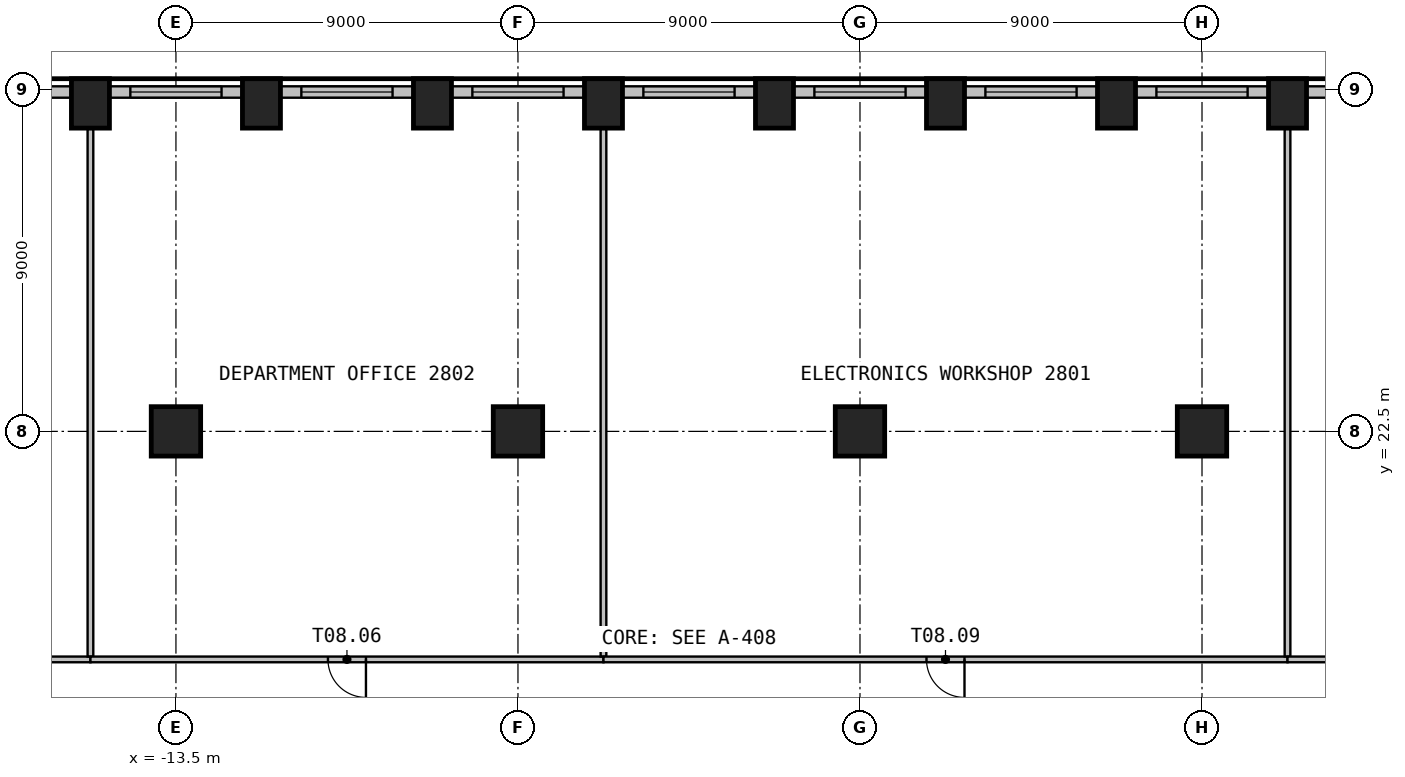
"""IFC4 building model, lengths in metres.
Left out: names, types, materials, properties, quantities, classifications, styles, units other than length and angle.
Written with IfcOpenShell. Run it as: python <this file> out.ifc"""

import sys

from ifc_helpers import new_model, si_unit, direction, frame, frame_2d, origin, origin_2d, place, context, subcontext, project, spatial, rectangle, circle, extrude, element, fill, save


model = new_model("IFC4")
c1 = context("Model", 3, precision=1e-05, world=origin(), true_north=direction((0.0, 1.0)))
c2 = subcontext(c1, "Body", "Model", "MODEL_VIEW")
j1 = project(units=[si_unit("LENGTHUNIT", "METRE"), si_unit("PLANEANGLEUNIT", "RADIAN")], contexts=[c1])
p1 = place(None, origin())
s1 = spatial("IfcSite", under=j1, at=p1, CompositionType="ELEMENT")
p2 = place(p1, origin())
s2 = spatial("IfcBuilding", under=s1, at=p2, CompositionType="ELEMENT")
p3 = place(p2, frame((0.0, 0.0, 116.4)))
s3 = spatial("IfcBuildingStorey", under=s2, at=p3, CompositionType="ELEMENT", Elevation=116.4)
for number, where, z_axis, x_axis in (
    (1, (15.75, 31.13, 0.0), (0.0, 0.0, 1.0), (-1.0, 0.0, 0.0)),
    (2, (11.25, 31.13, 0.0), (0.0, 0.0, 1.0), (-1.0, 0.0, 0.0)),
    (3, (6.75, 31.13, 0.0), (0.0, 0.0, 1.0), (-1.0, 0.0, 0.0)),
    (4, (2.25, 31.13, 0.0), (0.0, 0.0, 1.0), (-1.0, 0.0, 0.0)),
    (5, (-2.25, 31.13, 0.0), (0.0, 0.0, 1.0), (-1.0, 0.0, 0.0)),
    (6, (-6.75, 31.13, 0.0), (0.0, 0.0, 1.0), (-1.0, 0.0, 0.0)),
    (7, (-11.25, 31.13, 0.0), (0.0, 0.0, 1.0), (-1.0, 0.0, 0.0)),
    (8, (-15.75, 31.13, 0.0), (0.0, 0.0, 1.0), (-1.0, 0.0, 0.0)),
):
    element("IfcColumn", number, at=place(p3, frame(where, z_axis=z_axis, x_axis=x_axis)), inside=s3, PredefinedType="COLUMN", context=c2, shape_type="SweptSolid", body=[
        extrude(rectangle(XDim=1.0, YDim=1.3, at=origin_2d()), origin(), (0.0, 0.0, 1.0), 3.525),
    ])
for number, where, z_axis, x_axis in (
    (9, (-13.5, 22.5, 0.0), (0.0, 0.0, 1.0), (1.0, 0.0, 0.0)),
    (10, (-4.5, 22.5, 0.0), (0.0, 0.0, 1.0), (1.0, 0.0, 0.0)),
    (11, (4.5, 22.5, 0.0), (0.0, 0.0, 1.0), (1.0, 0.0, 0.0)),
    (12, (13.5, 22.5, 0.0), (0.0, 0.0, 1.0), (1.0, 0.0, 0.0)),
):
    element("IfcColumn", number, at=place(p3, frame(where, z_axis=z_axis, x_axis=x_axis)), inside=s3, PredefinedType="COLUMN", context=c2, shape_type="SweptSolid", body=[
        extrude(circle(Radius=0.65, at=origin_2d()), origin(), (0.0, 0.0, 1.0), 3.525),
    ])
p4 = place(p3, frame((19.443, 31.43, 0.0), z_axis=(0.0, 0.0, 1.0), x_axis=(-1.0, 0.0, 0.0)))
e13 = element("IfcWall", 13, at=p4, inside=s3, PredefinedType="SOLIDWALL", context=c2, shape_type="SweptSolid", body=[
    extrude(rectangle(XDim=3.192, YDim=0.3, at=frame_2d((1.596, 0.0))), origin(), (0.0, 0.0, 1.0), 3.525),
])
p5 = place(p4, frame((0.243, 0.0, 0.9)))
e14 = element("IfcOpeningElement", 14, at=p5, cuts=e13, PredefinedType="OPENING", context=c2, shape_type="SweptSolid", body=[
    extrude(rectangle(XDim=2.4, YDim=2.1, at=frame_2d((1.2, 1.05))), frame((0.0, 0.16, 0.0), z_axis=(0.0, -1.0, 0.0), x_axis=(1.0, 0.0, 0.0)), (0.0, 0.0, 1.0), 0.32),
])
p6 = place(p3, frame((15.25, 31.43, 0.0), z_axis=(0.0, 0.0, 1.0), x_axis=(-1.0, 0.0, 0.0)))
e15 = element("IfcWall", 15, at=p6, inside=s3, PredefinedType="SOLIDWALL", context=c2, shape_type="SweptSolid", body=[
    extrude(rectangle(XDim=3.499, YDim=0.3, at=frame_2d((1.75, 0.0))), origin(), (0.0, 0.0, 1.0), 3.525),
])
p7 = place(p6, frame((0.55, 0.0, 0.9)))
e16 = element("IfcOpeningElement", 16, at=p7, cuts=e15, PredefinedType="OPENING", context=c2, shape_type="SweptSolid", body=[
    extrude(rectangle(XDim=2.4, YDim=2.1, at=frame_2d((1.2, 1.05))), frame((0.0, 0.16, 0.0), z_axis=(0.0, -1.0, 0.0), x_axis=(1.0, 0.0, 0.0)), (0.0, 0.0, 1.0), 0.32),
])
p8 = place(p3, frame((10.75, 31.43, 0.0), z_axis=(0.0, 0.0, 1.0), x_axis=(-1.0, 0.0, 0.0)))
e17 = element("IfcWall", 17, at=p8, inside=s3, PredefinedType="SOLIDWALL", context=c2, shape_type="SweptSolid", body=[
    extrude(rectangle(XDim=3.499, YDim=0.3, at=frame_2d((1.75, 0.0))), origin(), (0.0, 0.0, 1.0), 3.525),
])
p9 = place(p8, frame((0.55, 0.0, 0.9)))
e18 = element("IfcOpeningElement", 18, at=p9, cuts=e17, PredefinedType="OPENING", context=c2, shape_type="SweptSolid", body=[
    extrude(rectangle(XDim=2.4, YDim=2.1, at=frame_2d((1.2, 1.05))), frame((0.0, 0.16, 0.0), z_axis=(0.0, -1.0, 0.0), x_axis=(1.0, 0.0, 0.0)), (0.0, 0.0, 1.0), 0.32),
])
p10 = place(p3, frame((6.25, 31.43, 0.0), z_axis=(0.0, 0.0, 1.0), x_axis=(-1.0, 0.0, 0.0)))
e19 = element("IfcWall", 19, at=p10, inside=s3, PredefinedType="SOLIDWALL", context=c2, shape_type="SweptSolid", body=[
    extrude(rectangle(XDim=3.499, YDim=0.3, at=frame_2d((1.75, 0.0))), origin(), (0.0, 0.0, 1.0), 3.525),
])
p11 = place(p10, frame((0.55, 0.0, 0.9)))
e20 = element("IfcOpeningElement", 20, at=p11, cuts=e19, PredefinedType="OPENING", context=c2, shape_type="SweptSolid", body=[
    extrude(rectangle(XDim=2.4, YDim=2.1, at=frame_2d((1.2, 1.05))), frame((0.0, 0.16, 0.0), z_axis=(0.0, -1.0, 0.0), x_axis=(1.0, 0.0, 0.0)), (0.0, 0.0, 1.0), 0.32),
])
p12 = place(p3, frame((1.75, 31.43, 0.0), z_axis=(0.0, 0.0, 1.0), x_axis=(-1.0, 0.0, 0.0)))
e21 = element("IfcWall", 21, at=p12, inside=s3, PredefinedType="SOLIDWALL", context=c2, shape_type="SweptSolid", body=[
    extrude(rectangle(XDim=3.499, YDim=0.3, at=frame_2d((1.75, 0.0))), origin(), (0.0, 0.0, 1.0), 3.525),
])
p13 = place(p12, frame((0.55, 0.0, 0.9)))
e22 = element("IfcOpeningElement", 22, at=p13, cuts=e21, PredefinedType="OPENING", context=c2, shape_type="SweptSolid", body=[
    extrude(rectangle(XDim=2.4, YDim=2.1, at=frame_2d((1.2, 1.05))), frame((0.0, 0.16, 0.0), z_axis=(0.0, -1.0, 0.0), x_axis=(1.0, 0.0, 0.0)), (0.0, 0.0, 1.0), 0.32),
])
p14 = place(p3, frame((-2.75, 31.43, 0.0), z_axis=(0.0, 0.0, 1.0), x_axis=(-1.0, 0.0, 0.0)))
e23 = element("IfcWall", 23, at=p14, inside=s3, PredefinedType="SOLIDWALL", context=c2, shape_type="SweptSolid", body=[
    extrude(rectangle(XDim=3.499, YDim=0.3, at=frame_2d((1.75, 0.0))), origin(), (0.0, 0.0, 1.0), 3.525),
])
p15 = place(p14, frame((0.55, 0.0, 0.9)))
e24 = element("IfcOpeningElement", 24, at=p15, cuts=e23, PredefinedType="OPENING", context=c2, shape_type="SweptSolid", body=[
    extrude(rectangle(XDim=2.4, YDim=2.1, at=frame_2d((1.2, 1.05))), frame((0.0, 0.16, 0.0), z_axis=(0.0, -1.0, 0.0), x_axis=(1.0, 0.0, 0.0)), (0.0, 0.0, 1.0), 0.32),
])
p16 = place(p3, frame((-7.25, 31.43, 0.0), z_axis=(0.0, 0.0, 1.0), x_axis=(-1.0, 0.0, 0.0)))
e25 = element("IfcWall", 25, at=p16, inside=s3, PredefinedType="SOLIDWALL", context=c2, shape_type="SweptSolid", body=[
    extrude(rectangle(XDim=3.499, YDim=0.3, at=frame_2d((1.75, 0.0))), origin(), (0.0, 0.0, 1.0), 3.525),
])
p17 = place(p16, frame((0.55, 0.0, 0.9)))
e26 = element("IfcOpeningElement", 26, at=p17, cuts=e25, PredefinedType="OPENING", context=c2, shape_type="SweptSolid", body=[
    extrude(rectangle(XDim=2.4, YDim=2.1, at=frame_2d((1.2, 1.05))), frame((0.0, 0.16, 0.0), z_axis=(0.0, -1.0, 0.0), x_axis=(1.0, 0.0, 0.0)), (0.0, 0.0, 1.0), 0.32),
])
p18 = place(p3, frame((-11.75, 31.43, 0.0), z_axis=(0.0, 0.0, 1.0), x_axis=(-1.0, 0.0, 0.0)))
e27 = element("IfcWall", 27, at=p18, inside=s3, PredefinedType="SOLIDWALL", context=c2, shape_type="SweptSolid", body=[
    extrude(rectangle(XDim=3.499, YDim=0.3, at=frame_2d((1.75, 0.0))), origin(), (0.0, 0.0, 1.0), 3.525),
])
p19 = place(p18, frame((0.55, 0.0, 0.9)))
e28 = element("IfcOpeningElement", 28, at=p19, cuts=e27, PredefinedType="OPENING", context=c2, shape_type="SweptSolid", body=[
    extrude(rectangle(XDim=2.4, YDim=2.1, at=frame_2d((1.2, 1.05))), frame((0.0, 0.16, 0.0), z_axis=(0.0, -1.0, 0.0), x_axis=(1.0, 0.0, 0.0)), (0.0, 0.0, 1.0), 0.32),
])
p20 = place(p3, frame((-16.25, 31.43, 0.0), z_axis=(0.0, 0.0, 1.0), x_axis=(-1.0, 0.0, 0.0)))
e29 = element("IfcWall", 29, at=p20, inside=s3, PredefinedType="SOLIDWALL", context=c2, shape_type="SweptSolid", body=[
    extrude(rectangle(XDim=3.192, YDim=0.3, at=frame_2d((1.596, 0.0))), origin(), (0.0, 0.0, 1.0), 3.525),
])
p21 = place(p20, frame((0.55, 0.0, 0.9)))
e30 = element("IfcOpeningElement", 30, at=p21, cuts=e29, PredefinedType="OPENING", context=c2, shape_type="SweptSolid", body=[
    extrude(rectangle(XDim=2.4, YDim=2.1, at=frame_2d((1.2, 1.05))), frame((0.0, 0.16, 0.0), z_axis=(0.0, -1.0, 0.0), x_axis=(1.0, 0.0, 0.0)), (0.0, 0.0, 1.0), 0.32),
])
p22 = place(p3, frame((-15.75, 16.5, 0.0), z_axis=(0.0, 0.0, 1.0), x_axis=(-1.0, 0.0, 0.0)))
e31 = element("IfcWall", 31, at=p22, inside=s3, PredefinedType="PARTITIONING", context=c2, shape_type="SweptSolid", body=[
    extrude(rectangle(XDim=5.175, YDim=0.15, at=frame_2d((2.587, 0.0))), origin(), (0.0, 0.0, 1.0), 3.525),
])
p23 = place(p3, frame((-15.75, 30.46, 0.0), z_axis=(0.0, 0.0, 1.0), x_axis=(0.0, -1.0, 0.0)))
e32 = element("IfcWall", 32, at=p23, inside=s3, PredefinedType="PARTITIONING", context=c2, shape_type="SweptSolid", body=[
    extrude(rectangle(XDim=13.885, YDim=0.15, at=frame_2d((6.942, 0.0))), origin(), (0.0, 0.0, 1.0), 3.525),
])
p24 = place(p3, frame((-2.25, 16.5, 0.0), z_axis=(0.0, 0.0, 1.0), x_axis=(-1.0, 0.0, 0.0)))
e33 = element("IfcWall", 33, at=p24, inside=s3, PredefinedType="PARTITIONING", context=c2, shape_type="SweptSolid", body=[
    extrude(rectangle(XDim=13.5, YDim=0.15, at=frame_2d((6.75, 0.0))), origin(), (0.0, 0.0, 1.0), 3.525),
])
p25 = place(p24, frame((6.25, 0.0, 0.0)))
e34 = element("IfcOpeningElement", 34, at=p25, cuts=e33, PredefinedType="OPENING", context=c2, shape_type="SweptSolid", body=[
    extrude(rectangle(XDim=1.0, YDim=2.1, at=frame_2d((0.5, 1.05))), frame((0.0, 0.085, 0.0), z_axis=(0.0, -1.0, 0.0), x_axis=(1.0, 0.0, 0.0)), (0.0, 0.0, 1.0), 0.17),
])
p26 = place(p3, frame((-2.25, 30.46, 0.0), z_axis=(0.0, 0.0, 1.0), x_axis=(0.0, -1.0, 0.0)))
e35 = element("IfcWall", 35, at=p26, inside=s3, PredefinedType="PARTITIONING", context=c2, shape_type="SweptSolid", body=[
    extrude(rectangle(XDim=13.885, YDim=0.15, at=frame_2d((6.942, 0.0))), origin(), (0.0, 0.0, 1.0), 3.525),
])
p27 = place(p3, frame((15.75, 16.5, 0.0), z_axis=(0.0, 0.0, 1.0), x_axis=(-1.0, 0.0, 0.0)))
e36 = element("IfcWall", 36, at=p27, inside=s3, PredefinedType="PARTITIONING", context=c2, shape_type="SweptSolid", body=[
    extrude(rectangle(XDim=18.0, YDim=0.15, at=frame_2d((9.0, 0.0))), origin(), (0.0, 0.0, 1.0), 3.525),
])
p28 = place(p27, frame((8.5, 0.0, 0.0)))
e37 = element("IfcOpeningElement", 37, at=p28, cuts=e36, PredefinedType="OPENING", context=c2, shape_type="SweptSolid", body=[
    extrude(rectangle(XDim=1.0, YDim=2.1, at=frame_2d((0.5, 1.05))), frame((0.0, 0.085, 0.0), z_axis=(0.0, -1.0, 0.0), x_axis=(1.0, 0.0, 0.0)), (0.0, 0.0, 1.0), 0.17),
])
p29 = place(p3, frame((15.75, 30.46, 0.0), z_axis=(0.0, 0.0, 1.0), x_axis=(0.0, -1.0, 0.0)))
e38 = element("IfcWall", 38, at=p29, inside=s3, PredefinedType="PARTITIONING", context=c2, shape_type="SweptSolid", body=[
    extrude(rectangle(XDim=13.885, YDim=0.15, at=frame_2d((6.942, 0.0))), origin(), (0.0, 0.0, 1.0), 3.525),
])
p30 = place(p3, frame((21.075, 16.5, 0.0), z_axis=(0.0, 0.0, 1.0), x_axis=(-1.0, 0.0, 0.0)))
e39 = element("IfcWall", 39, at=p30, inside=s3, PredefinedType="PARTITIONING", context=c2, shape_type="SweptSolid", body=[
    extrude(rectangle(XDim=5.325, YDim=0.15, at=frame_2d((2.663, 0.0))), origin(), (0.0, 0.0, 1.0), 3.525),
])
p31 = place(p7, origin())
e40 = element("IfcWindow", 40, at=p31, inside=s3, PartitioningType="SINGLE_PANEL", PredefinedType="WINDOW", context=c2, shape_type="SweptSolid", body=[
    extrude(rectangle(XDim=2.4, YDim=2.1, at=frame_2d((1.2, 1.05))), frame((0.0, 0.03, 0.0), z_axis=(0.0, -1.0, 0.0), x_axis=(1.0, 0.0, 0.0)), (0.0, 0.0, 1.0), 0.06),
])
fill(e16, e40)
p32 = place(p9, origin())
e41 = element("IfcWindow", 41, at=p32, inside=s3, PartitioningType="SINGLE_PANEL", PredefinedType="WINDOW", context=c2, shape_type="SweptSolid", body=[
    extrude(rectangle(XDim=2.4, YDim=2.1, at=frame_2d((1.2, 1.05))), frame((0.0, 0.03, 0.0), z_axis=(0.0, -1.0, 0.0), x_axis=(1.0, 0.0, 0.0)), (0.0, 0.0, 1.0), 0.06),
])
fill(e18, e41)
p33 = place(p11, origin())
e42 = element("IfcWindow", 42, at=p33, inside=s3, PartitioningType="SINGLE_PANEL", PredefinedType="WINDOW", context=c2, shape_type="SweptSolid", body=[
    extrude(rectangle(XDim=2.4, YDim=2.1, at=frame_2d((1.2, 1.05))), frame((0.0, 0.03, 0.0), z_axis=(0.0, -1.0, 0.0), x_axis=(1.0, 0.0, 0.0)), (0.0, 0.0, 1.0), 0.06),
])
fill(e20, e42)
p34 = place(p13, origin())
e43 = element("IfcWindow", 43, at=p34, inside=s3, PartitioningType="SINGLE_PANEL", PredefinedType="WINDOW", context=c2, shape_type="SweptSolid", body=[
    extrude(rectangle(XDim=2.4, YDim=2.1, at=frame_2d((1.2, 1.05))), frame((0.0, 0.03, 0.0), z_axis=(0.0, -1.0, 0.0), x_axis=(1.0, 0.0, 0.0)), (0.0, 0.0, 1.0), 0.06),
])
fill(e22, e43)
p35 = place(p15, origin())
e44 = element("IfcWindow", 44, at=p35, inside=s3, PartitioningType="SINGLE_PANEL", PredefinedType="WINDOW", context=c2, shape_type="SweptSolid", body=[
    extrude(rectangle(XDim=2.4, YDim=2.1, at=frame_2d((1.2, 1.05))), frame((0.0, 0.03, 0.0), z_axis=(0.0, -1.0, 0.0), x_axis=(1.0, 0.0, 0.0)), (0.0, 0.0, 1.0), 0.06),
])
fill(e24, e44)
p36 = place(p17, origin())
e45 = element("IfcWindow", 45, at=p36, inside=s3, PartitioningType="SINGLE_PANEL", PredefinedType="WINDOW", context=c2, shape_type="SweptSolid", body=[
    extrude(rectangle(XDim=2.4, YDim=2.1, at=frame_2d((1.2, 1.05))), frame((0.0, 0.03, 0.0), z_axis=(0.0, -1.0, 0.0), x_axis=(1.0, 0.0, 0.0)), (0.0, 0.0, 1.0), 0.06),
])
fill(e26, e45)
p37 = place(p19, origin())
e46 = element("IfcWindow", 46, at=p37, inside=s3, PartitioningType="SINGLE_PANEL", PredefinedType="WINDOW", context=c2, shape_type="SweptSolid", body=[
    extrude(rectangle(XDim=2.4, YDim=2.1, at=frame_2d((1.2, 1.05))), frame((0.0, 0.03, 0.0), z_axis=(0.0, -1.0, 0.0), x_axis=(1.0, 0.0, 0.0)), (0.0, 0.0, 1.0), 0.06),
])
fill(e28, e46)
p38 = place(p25, origin())
e47 = element("IfcDoor", 47, at=p38, inside=s3, OperationType="SINGLE_SWING_LEFT", PredefinedType="DOOR", context=c2, shape_type="SweptSolid", body=[
    extrude(rectangle(XDim=1.0, YDim=2.1, at=frame_2d((0.5, 1.05))), frame((0.0, 0.025, 0.0), z_axis=(0.0, -1.0, 0.0), x_axis=(1.0, 0.0, 0.0)), (0.0, 0.0, 1.0), 0.05),
])
fill(e34, e47)
p39 = place(p28, origin())
e48 = element("IfcDoor", 48, at=p39, inside=s3, OperationType="SINGLE_SWING_LEFT", PredefinedType="DOOR", context=c2, shape_type="SweptSolid", body=[
    extrude(rectangle(XDim=1.0, YDim=2.1, at=frame_2d((0.5, 1.05))), frame((0.0, 0.025, 0.0), z_axis=(0.0, -1.0, 0.0), x_axis=(1.0, 0.0, 0.0)), (0.0, 0.0, 1.0), 0.05),
])
fill(e37, e48)
save(model, sys.argv[1])
